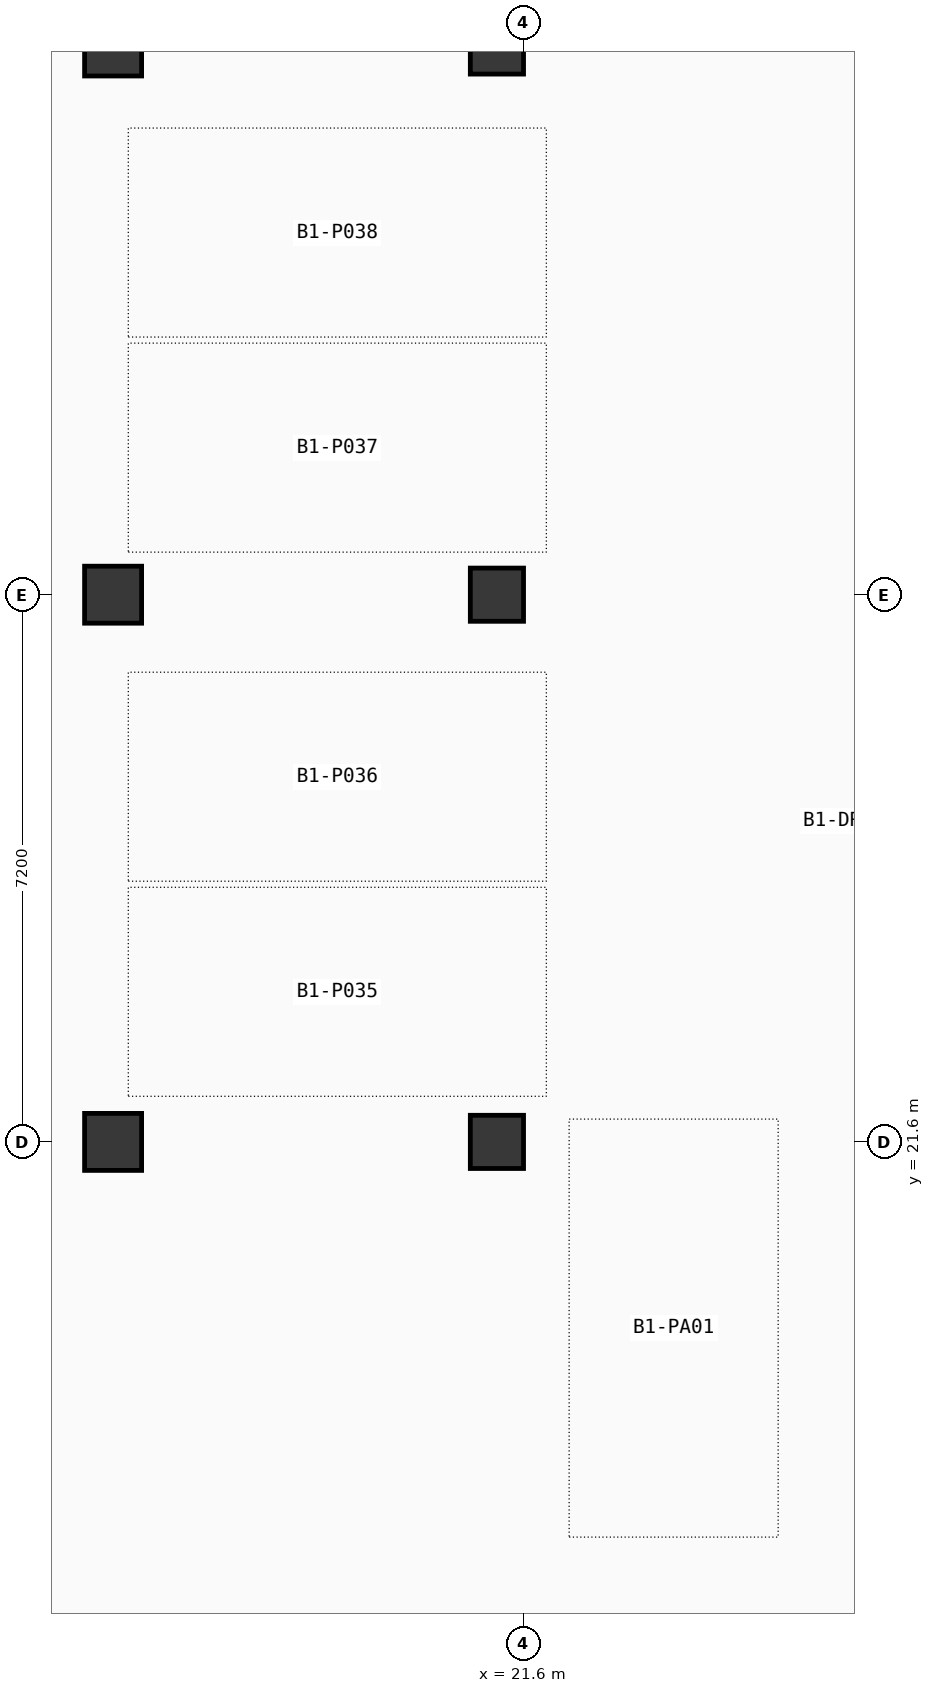
"""IFC4 building model, lengths in metres.
Left out: names, types, materials, properties, quantities, classifications, styles, units other than length and angle.
Written with IfcOpenShell. Run it as: python <this file> out.ifc"""

import sys

from ifc_helpers import new_model, si_unit, direction, frame, origin, origin_2d, place, context, subcontext, project, spatial, rectangle, extrude, element, save


model = new_model("IFC4")
c1 = context("Model", 3, precision=1e-05, world=origin(), true_north=direction((0.0, 1.0)))
c2 = subcontext(c1, "Body", "Model", "MODEL_VIEW")
j1 = project(units=[si_unit("LENGTHUNIT", "METRE"), si_unit("PLANEANGLEUNIT", "RADIAN")], contexts=[c1])
p1 = place(None, origin())
s1 = spatial("IfcSite", under=j1, at=p1, CompositionType="ELEMENT")
p2 = place(p1, origin())
s2 = spatial("IfcBuilding", under=s1, at=p2, CompositionType="ELEMENT")
p3 = place(p2, frame((0.0, 0.0, -4.2)))
s3 = spatial("IfcBuildingStorey", under=s2, at=p3, CompositionType="ELEMENT", Elevation=-4.2)
for number, where, z_axis, x_axis in (
    (1, (16.2, 21.6, 0.0), (0.0, 0.0, 1.0), (1.0, 0.0, 0.0)),
    (2, (16.2, 28.8, 0.0), (0.0, 0.0, 1.0), (1.0, 0.0, 0.0)),
    (3, (16.2, 36.0, 0.0), (0.0, 0.0, 1.0), (1.0, 0.0, 0.0)),
):
    element("IfcColumn", number, at=place(p3, frame(where, z_axis=z_axis, x_axis=x_axis)), inside=s3, PredefinedType="COLUMN", context=c2, shape_type="SweptSolid", body=[
        extrude(rectangle(XDim=0.75, YDim=0.75, at=origin_2d()), origin(), (0.0, 0.0, 1.0), 4.2),
    ])
for number, where, z_axis, x_axis in (
    (4, (21.25, 21.6, 0.0), (0.0, 0.0, 1.0), (1.0, 0.0, 0.0)),
    (5, (21.25, 28.8, 0.0), (0.0, 0.0, 1.0), (1.0, 0.0, 0.0)),
    (6, (21.25, 36.0, 0.0), (0.0, 0.0, 1.0), (1.0, 0.0, 0.0)),
):
    element("IfcColumn", number, at=place(p3, frame(where, z_axis=z_axis, x_axis=x_axis)), inside=s3, PredefinedType="COLUMN", context=c2, shape_type="SweptSolid", body=[
        extrude(rectangle(XDim=0.7, YDim=0.7, at=origin_2d()), origin(), (0.0, 0.0, 1.0), 4.2),
    ])
save(model, sys.argv[1])
